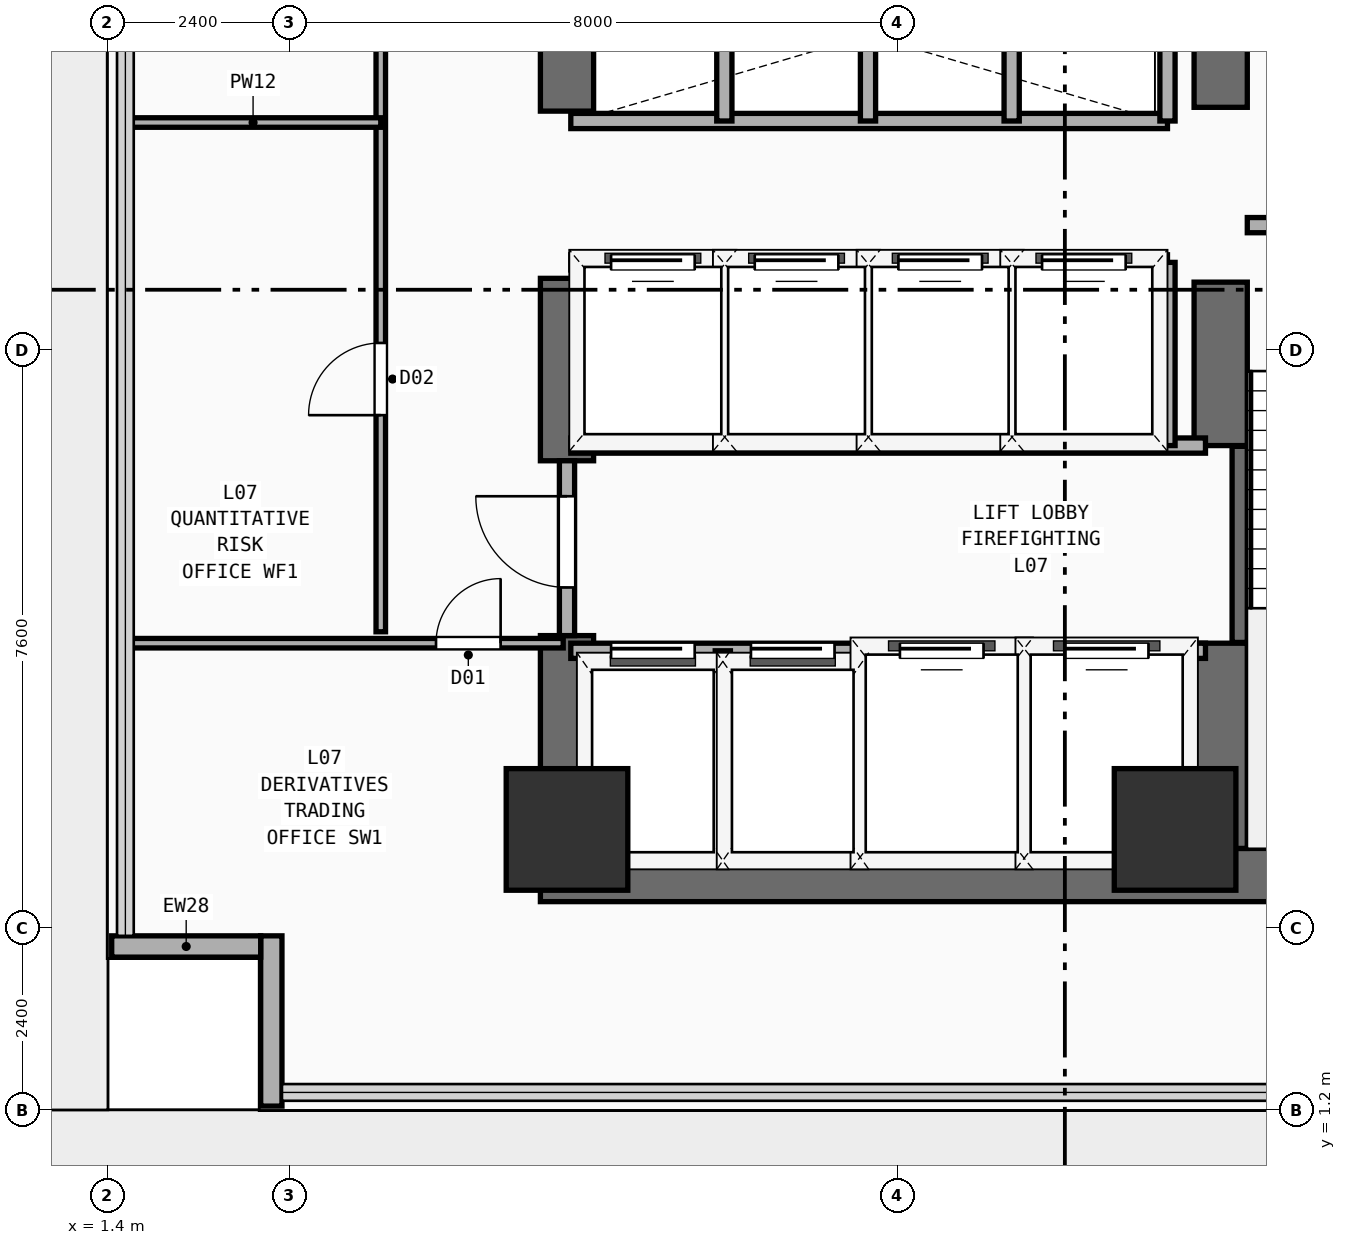
"""IFC4 building model, lengths in metres.
Left out: names, types, materials, properties, quantities, classifications, styles, units other than length and angle.
Written with IfcOpenShell. Run it as: python <this file> out.ifc"""

import sys

from ifc_helpers import new_model, si_unit, direction, frame, frame_2d, origin, origin_2d, place, context, subcontext, project, spatial, rectangle, extrude, element, fill, save


model = new_model("IFC4")
c1 = context("Model", 3, precision=1e-05, world=origin(), true_north=direction((0.0, 1.0)))
c2 = subcontext(c1, "Body", "Model", "MODEL_VIEW")
j1 = project(units=[si_unit("LENGTHUNIT", "METRE"), si_unit("PLANEANGLEUNIT", "RADIAN")], contexts=[c1])
p1 = place(None, origin())
s1 = spatial("IfcSite", under=j1, at=p1, CompositionType="ELEMENT")
p2 = place(p1, origin())
s2 = spatial("IfcBuilding", under=s1, at=p2, CompositionType="ELEMENT")
p3 = place(p2, frame((0.0, 0.0, 29.6)))
s3 = spatial("IfcBuildingStorey", under=s2, at=p3, CompositionType="ELEMENT", Elevation=29.6)
p4 = place(p3, frame((7.1, 4.3, 0.0), z_axis=(0.0, 0.0, 1.0), x_axis=(1.0, 0.0, 0.0)))
e1 = element("IfcWall", 1, at=p4, inside=s3, PredefinedType="SHEAR", context=c2, shape_type="SweptSolid", body=[
    extrude(rectangle(XDim=14.05, YDim=0.7, at=frame_2d((7.025, 0.0))), origin(), (0.0, 0.0, 1.0), 3.54),
])
p5 = place(p3, frame((7.45, 4.65, 0.0), z_axis=(0.0, 0.0, 1.0), x_axis=(0.0, 1.0, 0.0)))
e2 = element("IfcWall", 2, at=p5, inside=s3, PredefinedType="SHEAR", context=c2, shape_type="SweptSolid", body=[
    extrude(rectangle(XDim=2.8, YDim=0.7, at=frame_2d((1.4, 0.0))), origin(), (0.0, 0.0, 1.0), 3.54),
])
p6 = place(p3, frame((7.45, 9.75, 0.0), z_axis=(0.0, 0.0, 1.0), x_axis=(0.0, 1.0, 0.0)))
e3 = element("IfcWall", 3, at=p6, inside=s3, PredefinedType="SHEAR", context=c2, shape_type="SweptSolid", body=[
    extrude(rectangle(XDim=2.4, YDim=0.7, at=frame_2d((1.2, 0.0))), origin(), (0.0, 0.0, 1.0), 3.54),
])
p7 = place(p3, frame((7.45, 14.35, 0.0), z_axis=(0.0, 0.0, 1.0), x_axis=(0.0, 1.0, 0.0)))
e4 = element("IfcWall", 4, at=p7, inside=s3, PredefinedType="SHEAR", context=c2, shape_type="SweptSolid", body=[
    extrude(rectangle(XDim=4.81, YDim=0.7, at=frame_2d((2.405, 0.0))), origin(), (0.0, 0.0, 1.0), 3.54),
])
p8 = place(p3, frame((16.05, 4.65, 0.0), z_axis=(0.0, 0.0, 1.0), x_axis=(0.0, 1.0, 0.0)))
e5 = element("IfcWall", 5, at=p8, inside=s3, PredefinedType="SHEAR", context=c2, shape_type="SweptSolid", body=[
    extrude(rectangle(XDim=2.7, YDim=0.7, at=frame_2d((1.35, 0.0))), origin(), (0.0, 0.0, 1.0), 3.54),
])
p9 = place(p3, frame((16.05, 9.95, 0.0), z_axis=(0.0, 0.0, 1.0), x_axis=(0.0, 1.0, 0.0)))
e6 = element("IfcWall", 6, at=p9, inside=s3, PredefinedType="SHEAR", context=c2, shape_type="SweptSolid", body=[
    extrude(rectangle(XDim=2.15, YDim=0.7, at=frame_2d((1.075, 0.0))), origin(), (0.0, 0.0, 1.0), 3.54),
])
p10 = place(p3, frame((16.05, 14.4, 0.0), z_axis=(0.0, 0.0, 1.0), x_axis=(0.0, 1.0, 0.0)))
e7 = element("IfcWall", 7, at=p10, inside=s3, PredefinedType="SHEAR", context=c2, shape_type="SweptSolid", body=[
    extrude(rectangle(XDim=9.1, YDim=0.7, at=frame_2d((4.55, 0.0))), origin(), (0.0, 0.0, 1.0), 3.54),
])
for number, where, z_axis, x_axis in (
    (8, (7.45, 4.9, 0.0), (0.0, 0.0, 1.0), (1.0, 0.0, 0.0)),
    (9, (15.45, 4.9, 0.0), (0.0, 0.0, 1.0), (1.0, 0.0, 0.0)),
):
    element("IfcColumn", number, at=place(p3, frame(where, z_axis=z_axis, x_axis=x_axis)), inside=s3, PredefinedType="COLUMN", context=c2, shape_type="SweptSolid", body=[
        extrude(rectangle(XDim=1.6, YDim=1.6, at=origin_2d()), origin(), (0.0, 0.0, 1.0), 3.54),
    ])
p11 = place(p3, frame((3.56, 1.26, 0.0), z_axis=(0.0, 0.0, 1.0), x_axis=(0.0, 1.0, 0.0)))
e10 = element("IfcWall", 10, at=p11, inside=s3, PredefinedType="SOLIDWALL", context=c2, shape_type="SweptSolid", body=[
    extrude(rectangle(XDim=2.24, YDim=0.28, at=frame_2d((1.12, 0.0))), origin(), (0.0, 0.0, 1.0), 3.54),
])
p12 = place(p3, frame((1.46, 3.36, 0.0), z_axis=(0.0, 0.0, 1.0), x_axis=(1.0, 0.0, 0.0)))
e11 = element("IfcWall", 11, at=p12, inside=s3, PredefinedType="SOLIDWALL", context=c2, shape_type="SweptSolid", body=[
    extrude(rectangle(XDim=1.96, YDim=0.28, at=frame_2d((0.98, 0.0))), origin(), (0.0, 0.0, 1.0), 3.54),
])
p13 = place(p3, frame((16.3, 7.36, 0.0), z_axis=(0.0, 0.0, 1.0), x_axis=(0.0, 1.0, 0.0)))
e12 = element("IfcWall", 12, at=p13, inside=s3, PredefinedType="SHEAR", context=c2, shape_type="SweptSolid", body=[
    extrude(rectangle(XDim=2.58, YDim=0.2, at=frame_2d((1.29, 0.0))), origin(), (0.0, 0.0, 1.0), 3.54),
])
p14 = place(p3, frame((16.4, 12.85, 0.0), z_axis=(0.0, 0.0, 1.0), x_axis=(1.0, 0.0, 0.0)))
e13 = element("IfcWall", 13, at=p14, inside=s3, PredefinedType="PARTITIONING", context=c2, shape_type="SweptSolid", body=[
    extrude(rectangle(XDim=3.96, YDim=0.2, at=frame_2d((1.98, 0.0))), origin(), (0.0, 0.0, 1.0), 3.54),
])
p15 = place(p14, frame((1.304, 0.0, 0.0)))
e14 = element("IfcOpeningElement", 14, at=p15, cuts=e13, PredefinedType="OPENING", context=c2, shape_type="SweptSolid", body=[
    extrude(rectangle(XDim=1.1, YDim=2.2, at=frame_2d((0.55, 1.1))), frame((0.0, 0.11, 0.0), z_axis=(0.0, -1.0, 0.0), x_axis=(1.0, 0.0, 0.0)), (0.0, 0.0, 1.0), 0.22),
])
p16 = place(p3, frame((7.5, 7.25, 0.0), z_axis=(0.0, 0.0, 1.0), x_axis=(1.0, 0.0, 0.0)))
e15 = element("IfcWall", 15, at=p16, inside=s3, PredefinedType="PARTITIONING", context=c2, shape_type="SweptSolid", body=[
    extrude(rectangle(XDim=8.35, YDim=0.2, at=frame_2d((4.175, 0.0))), origin(), (0.0, 0.0, 1.0), 3.54),
])
p17 = place(p16, frame((0.53, 0.0, 0.0)))
e16 = element("IfcOpeningElement", 16, at=p17, cuts=e15, PredefinedType="OPENING", context=c2, shape_type="SweptSolid", body=[
    extrude(rectangle(XDim=1.1, YDim=2.2, at=frame_2d((0.55, 1.1))), frame((0.0, 0.11, 0.0), z_axis=(0.0, -1.0, 0.0), x_axis=(1.0, 0.0, 0.0)), (0.0, 0.0, 1.0), 0.22),
])
p18 = place(p16, frame((2.37, 0.0, 0.0)))
e17 = element("IfcOpeningElement", 17, at=p18, cuts=e15, PredefinedType="OPENING", context=c2, shape_type="SweptSolid", body=[
    extrude(rectangle(XDim=1.1, YDim=2.2, at=frame_2d((0.55, 1.1))), frame((0.0, 0.11, 0.0), z_axis=(0.0, -1.0, 0.0), x_axis=(1.0, 0.0, 0.0)), (0.0, 0.0, 1.0), 0.22),
])
p19 = place(p16, frame((4.33, 0.0, 0.0)))
e18 = element("IfcOpeningElement", 18, at=p19, cuts=e15, PredefinedType="OPENING", context=c2, shape_type="SweptSolid", body=[
    extrude(rectangle(XDim=1.1, YDim=2.2, at=frame_2d((0.55, 1.1))), frame((0.0, 0.11, 0.0), z_axis=(0.0, -1.0, 0.0), x_axis=(1.0, 0.0, 0.0)), (0.0, 0.0, 1.0), 0.22),
])
p20 = place(p16, frame((6.5, 0.0, 0.0)))
e19 = element("IfcOpeningElement", 19, at=p20, cuts=e15, PredefinedType="OPENING", context=c2, shape_type="SweptSolid", body=[
    extrude(rectangle(XDim=1.1, YDim=2.2, at=frame_2d((0.55, 1.1))), frame((0.0, 0.11, 0.0), z_axis=(0.0, -1.0, 0.0), x_axis=(1.0, 0.0, 0.0)), (0.0, 0.0, 1.0), 0.22),
])
p21 = place(p3, frame((7.5, 9.95, 0.0), z_axis=(0.0, 0.0, 1.0), x_axis=(1.0, 0.0, 0.0)))
e20 = element("IfcWall", 20, at=p21, inside=s3, PredefinedType="PARTITIONING", context=c2, shape_type="SweptSolid", body=[
    extrude(rectangle(XDim=8.35, YDim=0.2, at=frame_2d((4.175, 0.0))), origin(), (0.0, 0.0, 1.0), 3.54),
])
for number, where, z_axis, x_axis in (
    (21, (9.5, 4.45, 0.0), (0.0, 0.0, 1.0), (0.0, 1.0, 0.0)),
    (22, (11.36, 4.45, 0.0), (0.0, 0.0, 1.0), (0.0, 1.0, 0.0)),
    (23, (13.46, 4.45, 0.0), (0.0, 0.0, 1.0), (0.0, 1.0, 0.0)),
):
    element("IfcWall", number, at=place(p3, frame(where, z_axis=z_axis, x_axis=x_axis)), inside=s3, PredefinedType="PARTITIONING", context=c2, shape_type="SweptSolid", body=[
        extrude(rectangle(XDim=2.8, YDim=0.2, at=frame_2d((1.4, 0.0))), origin(), (0.0, 0.0, 1.0), 3.54),
    ])
p22 = place(p3, frame((7.45, 7.45, 0.0), z_axis=(0.0, 0.0, 1.0), x_axis=(0.0, 1.0, 0.0)))
e24 = element("IfcWall", 24, at=p22, inside=s3, PredefinedType="PARTITIONING", context=c2, shape_type="SweptSolid", body=[
    extrude(rectangle(XDim=2.3, YDim=0.2, at=frame_2d((1.15, 0.0))), origin(), (0.0, 0.0, 1.0), 2.52),
])
p23 = place(p22, frame((0.633, 0.0, 0.0)))
e25 = element("IfcOpeningElement", 25, at=p23, cuts=e24, PredefinedType="OPENING", context=c2, shape_type="SweptSolid", body=[
    extrude(rectangle(XDim=1.2, YDim=2.25, at=frame_2d((0.6, 1.125))), frame((0.0, 0.11, 0.0), z_axis=(0.0, -1.0, 0.0), x_axis=(1.0, 0.0, 0.0)), (0.0, 0.0, 1.0), 0.22),
])
p24 = place(p3, frame((7.5, 12.36, 0.0), z_axis=(0.0, 0.0, 1.0), x_axis=(1.0, 0.0, 0.0)))
e26 = element("IfcWall", 26, at=p24, inside=s3, PredefinedType="PARTITIONING", context=c2, shape_type="SweptSolid", body=[
    extrude(rectangle(XDim=7.85, YDim=0.2, at=frame_2d((3.925, 0.0))), origin(), (0.0, 0.0, 1.0), 3.54),
])
p25 = place(p24, frame((0.53, 0.0, 0.0)))
e27 = element("IfcOpeningElement", 27, at=p25, cuts=e26, PredefinedType="OPENING", context=c2, shape_type="SweptSolid", body=[
    extrude(rectangle(XDim=1.1, YDim=2.2, at=frame_2d((0.55, 1.1))), frame((0.0, 0.11, 0.0), z_axis=(0.0, -1.0, 0.0), x_axis=(1.0, 0.0, 0.0)), (0.0, 0.0, 1.0), 0.22),
])
p26 = place(p24, frame((2.42, 0.0, 0.0)))
e28 = element("IfcOpeningElement", 28, at=p26, cuts=e26, PredefinedType="OPENING", context=c2, shape_type="SweptSolid", body=[
    extrude(rectangle(XDim=1.1, YDim=2.2, at=frame_2d((0.55, 1.1))), frame((0.0, 0.11, 0.0), z_axis=(0.0, -1.0, 0.0), x_axis=(1.0, 0.0, 0.0)), (0.0, 0.0, 1.0), 0.22),
])
p27 = place(p24, frame((4.31, 0.0, 0.0)))
e29 = element("IfcOpeningElement", 29, at=p27, cuts=e26, PredefinedType="OPENING", context=c2, shape_type="SweptSolid", body=[
    extrude(rectangle(XDim=1.1, YDim=2.2, at=frame_2d((0.55, 1.1))), frame((0.0, 0.11, 0.0), z_axis=(0.0, -1.0, 0.0), x_axis=(1.0, 0.0, 0.0)), (0.0, 0.0, 1.0), 0.22),
])
p28 = place(p24, frame((6.2, 0.0, 0.0)))
e30 = element("IfcOpeningElement", 30, at=p28, cuts=e26, PredefinedType="OPENING", context=c2, shape_type="SweptSolid", body=[
    extrude(rectangle(XDim=1.1, YDim=2.2, at=frame_2d((0.55, 1.1))), frame((0.0, 0.11, 0.0), z_axis=(0.0, -1.0, 0.0), x_axis=(1.0, 0.0, 0.0)), (0.0, 0.0, 1.0), 0.22),
])
for number, where, z_axis, x_axis in (
    (31, (15.35, 9.95, 0.0), (0.0, 0.0, 1.0), (0.0, 1.0, 0.0)),
    (32, (9.52, 9.95, 0.0), (0.0, 0.0, 1.0), (0.0, 1.0, 0.0)),
    (33, (11.41, 9.95, 0.0), (0.0, 0.0, 1.0), (0.0, 1.0, 0.0)),
    (34, (13.3, 9.95, 0.0), (0.0, 0.0, 1.0), (0.0, 1.0, 0.0)),
):
    element("IfcWall", number, at=place(p3, frame(where, z_axis=z_axis, x_axis=x_axis)), inside=s3, PredefinedType="PARTITIONING", context=c2, shape_type="SweptSolid", body=[
        extrude(rectangle(XDim=2.41, YDim=0.2, at=frame_2d((1.205, 0.0))), origin(), (0.0, 0.0, 1.0), 3.54),
    ])
p29 = place(p3, frame((7.5, 14.22, 0.0), z_axis=(0.0, 0.0, 1.0), x_axis=(1.0, 0.0, 0.0)))
e35 = element("IfcWall", 35, at=p29, inside=s3, PredefinedType="PARTITIONING", context=c2, shape_type="SweptSolid", body=[
    extrude(rectangle(XDim=7.85, YDim=0.2, at=frame_2d((3.925, 0.0))), origin(), (0.0, 0.0, 1.0), 3.54),
])
for number, where, z_axis, x_axis in (
    (36, (15.35, 14.22, 0.0), (0.0, 0.0, 1.0), (0.0, 1.0, 0.0)),
    (37, (9.52, 14.22, 0.0), (0.0, 0.0, 1.0), (0.0, 1.0, 0.0)),
    (38, (11.41, 14.22, 0.0), (0.0, 0.0, 1.0), (0.0, 1.0, 0.0)),
    (39, (13.3, 14.22, 0.0), (0.0, 0.0, 1.0), (0.0, 1.0, 0.0)),
):
    element("IfcWall", number, at=place(p3, frame(where, z_axis=z_axis, x_axis=x_axis)), inside=s3, PredefinedType="PARTITIONING", context=c2, shape_type="SweptSolid", body=[
        extrude(rectangle(XDim=2.23, YDim=0.2, at=frame_2d((1.115, 0.0))), origin(), (0.0, 0.0, 1.0), 3.54),
    ])
p30 = place(p3, frame((1.64, 7.35, 0.0), z_axis=(0.0, 0.0, 1.0), x_axis=(1.0, 0.0, 0.0)))
e40 = element("IfcWall", 40, at=p30, inside=s3, PredefinedType="PARTITIONING", context=c2, shape_type="SweptSolid", body=[
    extrude(rectangle(XDim=5.76, YDim=0.125, at=frame_2d((2.88, 0.0))), origin(), (0.0, 0.0, 1.0), 3.54),
])
p31 = place(p30, frame((4.087, 0.0, 0.0)))
e41 = element("IfcOpeningElement", 41, at=p31, cuts=e40, PredefinedType="OPENING", context=c2, shape_type="SweptSolid", body=[
    extrude(rectangle(XDim=0.85, YDim=2.15, at=frame_2d((0.425, 1.075))), frame((0.0, 0.073, 0.0), z_axis=(0.0, -1.0, 0.0), x_axis=(1.0, 0.0, 0.0)), (0.0, 0.0, 1.0), 0.145),
])
p32 = place(p3, frame((5.0, 7.5, 0.0), z_axis=(0.0, 0.0, 1.0), x_axis=(0.0, 1.0, 0.0)))
e42 = element("IfcWall", 42, at=p32, inside=s3, PredefinedType="PARTITIONING", context=c2, shape_type="SweptSolid", body=[
    extrude(rectangle(XDim=17.75, YDim=0.125, at=frame_2d((8.875, 0.0))), origin(), (0.0, 0.0, 1.0), 3.54),
])
p33 = place(p32, frame((2.85, 0.0, 0.0)))
e43 = element("IfcOpeningElement", 43, at=p33, cuts=e42, PredefinedType="OPENING", context=c2, shape_type="SweptSolid", body=[
    extrude(rectangle(XDim=0.95, YDim=2.15, at=frame_2d((0.475, 1.075))), frame((0.0, 0.073, 0.0), z_axis=(0.0, -1.0, 0.0), x_axis=(1.0, 0.0, 0.0)), (0.0, 0.0, 1.0), 0.145),
])
p34 = place(p32, frame((11.821, 0.0, 0.0)))
e44 = element("IfcOpeningElement", 44, at=p34, cuts=e42, PredefinedType="OPENING", context=c2, shape_type="SweptSolid", body=[
    extrude(rectangle(XDim=0.95, YDim=2.15, at=frame_2d((0.475, 1.075))), frame((0.0, 0.073, 0.0), z_axis=(0.0, -1.0, 0.0), x_axis=(1.0, 0.0, 0.0)), (0.0, 0.0, 1.0), 0.145),
])
p35 = place(p3, frame((1.64, 14.2, 0.0), z_axis=(0.0, 0.0, 1.0), x_axis=(1.0, 0.0, 0.0)))
e45 = element("IfcWall", 45, at=p35, inside=s3, PredefinedType="PARTITIONING", context=c2, shape_type="SweptSolid", body=[
    extrude(rectangle(XDim=3.36, YDim=0.125, at=frame_2d((1.68, 0.0))), origin(), (0.0, 0.0, 1.0), 3.54),
])
p36 = place(p17, origin())
e46 = element("IfcDoor", 46, at=p36, inside=s3, OperationType="SLIDING_TO_LEFT", PredefinedType="DOOR", context=c2, shape_type="SweptSolid", body=[
    extrude(rectangle(XDim=1.1, YDim=2.2, at=frame_2d((0.55, 1.1))), frame((0.0, 0.025, 0.0), z_axis=(0.0, -1.0, 0.0), x_axis=(1.0, 0.0, 0.0)), (0.0, 0.0, 1.0), 0.05),
])
fill(e16, e46)
p37 = place(p18, origin())
e47 = element("IfcDoor", 47, at=p37, inside=s3, OperationType="SLIDING_TO_LEFT", PredefinedType="DOOR", context=c2, shape_type="SweptSolid", body=[
    extrude(rectangle(XDim=1.1, YDim=2.2, at=frame_2d((0.55, 1.1))), frame((0.0, 0.025, 0.0), z_axis=(0.0, -1.0, 0.0), x_axis=(1.0, 0.0, 0.0)), (0.0, 0.0, 1.0), 0.05),
])
fill(e17, e47)
p38 = place(p19, origin())
e48 = element("IfcDoor", 48, at=p38, inside=s3, OperationType="SLIDING_TO_LEFT", PredefinedType="DOOR", context=c2, shape_type="SweptSolid", body=[
    extrude(rectangle(XDim=1.1, YDim=2.2, at=frame_2d((0.55, 1.1))), frame((0.0, 0.025, 0.0), z_axis=(0.0, -1.0, 0.0), x_axis=(1.0, 0.0, 0.0)), (0.0, 0.0, 1.0), 0.05),
])
fill(e18, e48)
p39 = place(p20, origin())
e49 = element("IfcDoor", 49, at=p39, inside=s3, OperationType="SLIDING_TO_LEFT", PredefinedType="DOOR", context=c2, shape_type="SweptSolid", body=[
    extrude(rectangle(XDim=1.1, YDim=2.2, at=frame_2d((0.55, 1.1))), frame((0.0, 0.025, 0.0), z_axis=(0.0, -1.0, 0.0), x_axis=(1.0, 0.0, 0.0)), (0.0, 0.0, 1.0), 0.05),
])
fill(e19, e49)
p40 = place(p23, frame((1.2, 0.0, 0.0), z_axis=(0.0, 0.0, 1.0), x_axis=(-1.0, 0.0, 0.0)))
e50 = element("IfcDoor", 50, at=p40, inside=s3, OperationType="SINGLE_SWING_LEFT", PredefinedType="DOOR", context=c2, shape_type="SweptSolid", body=[
    extrude(rectangle(XDim=1.2, YDim=2.25, at=frame_2d((0.6, 1.125))), frame((0.0, 0.025, 0.0), z_axis=(0.0, -1.0, 0.0), x_axis=(1.0, 0.0, 0.0)), (0.0, 0.0, 1.0), 0.05),
])
fill(e25, e50)
p41 = place(p25, origin())
e51 = element("IfcDoor", 51, at=p41, inside=s3, OperationType="SLIDING_TO_LEFT", PredefinedType="DOOR", context=c2, shape_type="SweptSolid", body=[
    extrude(rectangle(XDim=1.1, YDim=2.2, at=frame_2d((0.55, 1.1))), frame((0.0, 0.025, 0.0), z_axis=(0.0, -1.0, 0.0), x_axis=(1.0, 0.0, 0.0)), (0.0, 0.0, 1.0), 0.05),
])
fill(e27, e51)
p42 = place(p26, origin())
e52 = element("IfcDoor", 52, at=p42, inside=s3, OperationType="SLIDING_TO_LEFT", PredefinedType="DOOR", context=c2, shape_type="SweptSolid", body=[
    extrude(rectangle(XDim=1.1, YDim=2.2, at=frame_2d((0.55, 1.1))), frame((0.0, 0.025, 0.0), z_axis=(0.0, -1.0, 0.0), x_axis=(1.0, 0.0, 0.0)), (0.0, 0.0, 1.0), 0.05),
])
fill(e28, e52)
p43 = place(p27, origin())
e53 = element("IfcDoor", 53, at=p43, inside=s3, OperationType="SLIDING_TO_LEFT", PredefinedType="DOOR", context=c2, shape_type="SweptSolid", body=[
    extrude(rectangle(XDim=1.1, YDim=2.2, at=frame_2d((0.55, 1.1))), frame((0.0, 0.025, 0.0), z_axis=(0.0, -1.0, 0.0), x_axis=(1.0, 0.0, 0.0)), (0.0, 0.0, 1.0), 0.05),
])
fill(e29, e53)
p44 = place(p28, origin())
e54 = element("IfcDoor", 54, at=p44, inside=s3, OperationType="SLIDING_TO_LEFT", PredefinedType="DOOR", context=c2, shape_type="SweptSolid", body=[
    extrude(rectangle(XDim=1.1, YDim=2.2, at=frame_2d((0.55, 1.1))), frame((0.0, 0.025, 0.0), z_axis=(0.0, -1.0, 0.0), x_axis=(1.0, 0.0, 0.0)), (0.0, 0.0, 1.0), 0.05),
])
fill(e30, e54)
p45 = place(p31, origin())
e55 = element("IfcDoor", 55, at=p45, inside=s3, OperationType="SINGLE_SWING_RIGHT", PredefinedType="DOOR", context=c2, shape_type="SweptSolid", body=[
    extrude(rectangle(XDim=0.85, YDim=2.15, at=frame_2d((0.425, 1.075))), frame((0.0, 0.025, 0.0), z_axis=(0.0, -1.0, 0.0), x_axis=(1.0, 0.0, 0.0)), (0.0, 0.0, 1.0), 0.05),
])
fill(e41, e55)
p46 = place(p33, origin())
e56 = element("IfcDoor", 56, at=p46, inside=s3, OperationType="SINGLE_SWING_LEFT", PredefinedType="DOOR", context=c2, shape_type="SweptSolid", body=[
    extrude(rectangle(XDim=0.95, YDim=2.15, at=frame_2d((0.475, 1.075))), frame((0.0, 0.025, 0.0), z_axis=(0.0, -1.0, 0.0), x_axis=(1.0, 0.0, 0.0)), (0.0, 0.0, 1.0), 0.05),
])
fill(e43, e56)
save(model, sys.argv[1])
